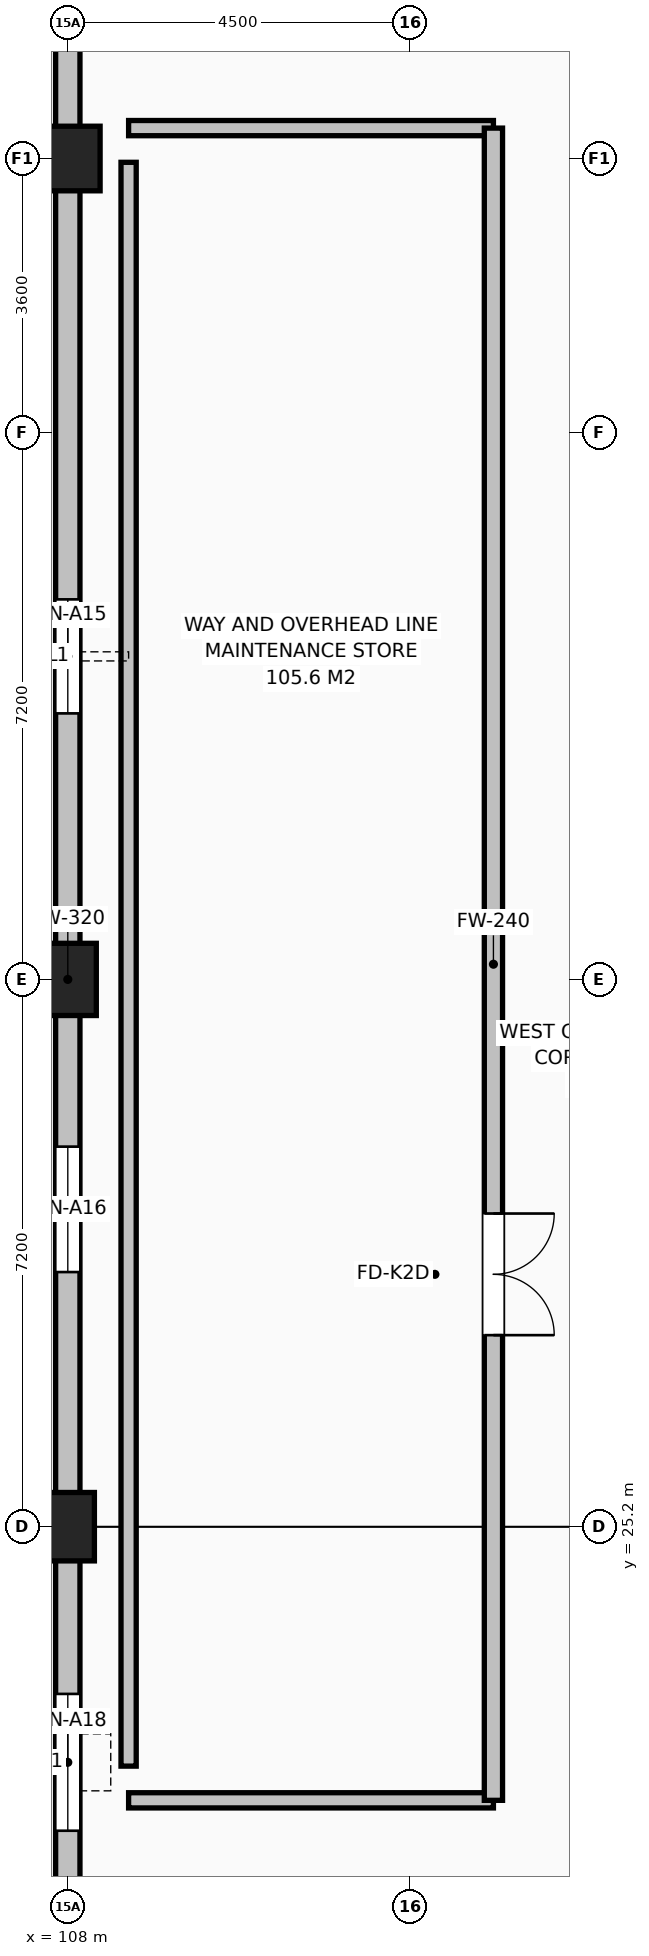
"""IFC4 building model, lengths in metres.
Left out: names, types, materials, properties, quantities, classifications, styles, units other than length and angle.
Written with IfcOpenShell. Run it as: python <this file> out.ifc"""

import sys

from ifc_helpers import new_model, si_unit, direction, frame, frame_2d, origin, origin_2d, place, context, subcontext, project, spatial, rectangle, extrude, element, fill, save


model = new_model("IFC4")
c1 = context("Model", 3, precision=1e-05, world=origin(), true_north=direction((0.0, 1.0)))
c2 = subcontext(c1, "Body", "Model", "MODEL_VIEW")
j1 = project(units=[si_unit("LENGTHUNIT", "METRE"), si_unit("PLANEANGLEUNIT", "RADIAN")], contexts=[c1])
p1 = place(None, origin())
s1 = spatial("IfcSite", under=j1, at=p1, CompositionType="ELEMENT")
p2 = place(p1, origin())
s2 = spatial("IfcBuilding", under=s1, at=p2, CompositionType="ELEMENT")
p3 = place(p2, origin())
s3 = spatial("IfcBuildingStorey", under=s2, at=p3, CompositionType="ELEMENT", Elevation=0.0)
p4 = place(p3, frame((108.0, 25.2, 0.0), z_axis=(0.0, 0.0, 1.0), x_axis=(1.0, 0.0, 0.0)))
e1 = element("IfcColumn", 1, at=p4, inside=s3, PredefinedType="COLUMN", context=c2, shape_type="SweptSolid", body=[
    extrude(rectangle(XDim=0.7, YDim=0.9, at=origin_2d()), origin(), (0.0, 0.0, 1.0), 4.8),
])
p5 = place(p3, frame((108.0, 32.4, 0.0), z_axis=(0.0, 0.0, 1.0), x_axis=(1.0, 0.0, 0.0)))
e2 = element("IfcColumn", 2, at=p5, inside=s3, PredefinedType="COLUMN", context=c2, shape_type="SweptSolid", body=[
    extrude(rectangle(XDim=0.75, YDim=0.95, at=origin_2d()), origin(), (0.0, 0.0, 1.0), 4.8),
])
p6 = place(p3, frame((108.0, 43.2, 0.0), z_axis=(0.0, 0.0, 1.0), x_axis=(1.0, 0.0, 0.0)))
e3 = element("IfcColumn", 3, at=p6, inside=s3, PredefinedType="COLUMN", context=c2, shape_type="SweptSolid", body=[
    extrude(rectangle(XDim=0.85, YDim=0.85, at=origin_2d()), origin(), (0.0, 0.0, 1.0), 4.8),
])
p7 = place(p3, frame((108.0, 54.0, 0.0), z_axis=(0.0, 0.0, 1.0), x_axis=(0.0, -1.0, 0.0)))
e4 = element("IfcWall", 4, at=p7, inside=s3, PredefinedType="SOLIDWALL", context=c2, shape_type="SweptSolid", body=[
    extrude(rectangle(XDim=43.2, YDim=0.32, at=frame_2d((21.6, 0.0))), origin(), (0.0, 0.0, 1.0), 4.25),
])
p8 = place(p7, frame((2.2, 0.0, 0.72)))
e5 = element("IfcOpeningElement", 5, at=p8, cuts=e4, PredefinedType="OPENING", context=c2, shape_type="SweptSolid", body=[
    extrude(rectangle(XDim=1.2, YDim=2.0, at=frame_2d((0.6, 1.0))), frame((0.0, 0.17, 0.0), z_axis=(0.0, -1.0, 0.0), x_axis=(1.0, 0.0, 0.0)), (0.0, 0.0, 1.0), 0.34),
])
p9 = place(p7, frame((16.6, 0.0, 0.72)))
e6 = element("IfcOpeningElement", 6, at=p9, cuts=e4, PredefinedType="OPENING", context=c2, shape_type="SweptSolid", body=[
    extrude(rectangle(XDim=1.5, YDim=2.1, at=frame_2d((0.75, 1.05))), frame((0.0, 0.17, 0.0), z_axis=(0.0, -1.0, 0.0), x_axis=(1.0, 0.0, 0.0)), (0.0, 0.0, 1.0), 0.34),
])
p10 = place(p7, frame((23.8, 0.0, 0.72)))
e7 = element("IfcOpeningElement", 7, at=p10, cuts=e4, PredefinedType="OPENING", context=c2, shape_type="SweptSolid", body=[
    extrude(rectangle(XDim=1.65, YDim=2.1, at=frame_2d((0.825, 1.05))), frame((0.0, 0.17, 0.0), z_axis=(0.0, -1.0, 0.0), x_axis=(1.0, 0.0, 0.0)), (0.0, 0.0, 1.0), 0.34),
])
p11 = place(p7, frame((31.0, 0.0, 0.72)))
e8 = element("IfcOpeningElement", 8, at=p11, cuts=e4, PredefinedType="OPENING", context=c2, shape_type="SweptSolid", body=[
    extrude(rectangle(XDim=1.8, YDim=2.15, at=frame_2d((0.9, 1.075))), frame((0.0, 0.17, 0.0), z_axis=(0.0, -1.0, 0.0), x_axis=(1.0, 0.0, 0.0)), (0.0, 0.0, 1.0), 0.34),
])
p12 = place(p7, frame((6.2, 0.0, 0.0)))
e9 = element("IfcOpeningElement", 9, at=p12, cuts=e4, PredefinedType="OPENING", context=c2, shape_type="SweptSolid", body=[
    extrude(rectangle(XDim=2.0, YDim=2.35, at=frame_2d((1.0, 1.175))), frame((0.0, 0.17, 0.0), z_axis=(0.0, -1.0, 0.0), x_axis=(1.0, 0.0, 0.0)), (0.0, 0.0, 1.0), 0.34),
])
for number, where, z_axis, x_axis in (
    (10, (108.8, 43.6, 0.0), (0.0, 0.0, 1.0), (1.0, 0.0, 0.0)),
    (11, (113.6, 21.6, 0.0), (0.0, 0.0, 1.0), (-1.0, 0.0, 0.0)),
):
    element("IfcWall", number, at=place(p3, frame(where, z_axis=z_axis, x_axis=x_axis)), inside=s3, PredefinedType="SOLIDWALL", context=c2, shape_type="SweptSolid", body=[
        extrude(rectangle(XDim=4.8, YDim=0.2, at=frame_2d((2.4, 0.0))), origin(), (0.0, 0.0, 1.0), 4.0),
    ])
p13 = place(p3, frame((108.8, 43.15, 0.0), z_axis=(0.0, 0.0, 1.0), x_axis=(0.0, -1.0, 0.0)))
e12 = element("IfcWall", 12, at=p13, inside=s3, PredefinedType="SOLIDWALL", context=c2, shape_type="SweptSolid", body=[
    extrude(rectangle(XDim=21.1, YDim=0.2, at=frame_2d((10.55, 0.0))), origin(), (0.0, 0.0, 1.0), 3.807),
])
p14 = place(p3, frame((113.6, 21.6, 0.0), z_axis=(0.0, 0.0, 1.0), x_axis=(0.0, 1.0, 0.0)))
e13 = element("IfcWall", 13, at=p14, inside=s3, PredefinedType="SOLIDWALL", context=c2, shape_type="SweptSolid", body=[
    extrude(rectangle(XDim=22.0, YDim=0.24, at=frame_2d((11.0, 0.0))), origin(), (0.0, 0.0, 1.0), 3.807),
])
p15 = place(p14, frame((6.12, 0.0, 0.0)))
e14 = element("IfcOpeningElement", 14, at=p15, cuts=e13, PredefinedType="OPENING", context=c2, shape_type="SweptSolid", body=[
    extrude(rectangle(XDim=1.6, YDim=2.15, at=frame_2d((0.8, 1.075))), frame((0.0, 0.13, 0.0), z_axis=(0.0, -1.0, 0.0), x_axis=(1.0, 0.0, 0.0)), (0.0, 0.0, 1.0), 0.26),
])
p16 = place(p9, origin())
e15 = element("IfcWindow", 15, at=p16, inside=s3, PartitioningType="SINGLE_PANEL", PredefinedType="WINDOW", context=c2, shape_type="SweptSolid", body=[
    extrude(rectangle(XDim=1.5, YDim=2.1, at=frame_2d((0.75, 1.05))), frame((0.0, 0.03, 0.0), z_axis=(0.0, -1.0, 0.0), x_axis=(1.0, 0.0, 0.0)), (0.0, 0.0, 1.0), 0.06),
])
fill(e6, e15)
p17 = place(p10, origin())
e16 = element("IfcWindow", 16, at=p17, inside=s3, PartitioningType="SINGLE_PANEL", PredefinedType="WINDOW", context=c2, shape_type="SweptSolid", body=[
    extrude(rectangle(XDim=1.65, YDim=2.1, at=frame_2d((0.825, 1.05))), frame((0.0, 0.03, 0.0), z_axis=(0.0, -1.0, 0.0), x_axis=(1.0, 0.0, 0.0)), (0.0, 0.0, 1.0), 0.06),
])
fill(e7, e16)
p18 = place(p11, origin())
e17 = element("IfcWindow", 17, at=p18, inside=s3, PartitioningType="SINGLE_PANEL", PredefinedType="WINDOW", context=c2, shape_type="SweptSolid", body=[
    extrude(rectangle(XDim=1.8, YDim=2.15, at=frame_2d((0.9, 1.075))), frame((0.0, 0.03, 0.0), z_axis=(0.0, -1.0, 0.0), x_axis=(1.0, 0.0, 0.0)), (0.0, 0.0, 1.0), 0.06),
])
fill(e8, e17)
p19 = place(p15, origin())
e18 = element("IfcDoor", 18, at=p19, inside=s3, OperationType="DOUBLE_SWING_RIGHT", PredefinedType="DOOR", context=c2, shape_type="SweptSolid", body=[
    extrude(rectangle(XDim=1.6, YDim=2.15, at=frame_2d((0.8, 1.075))), frame((0.0, 0.025, 0.0), z_axis=(0.0, -1.0, 0.0), x_axis=(1.0, 0.0, 0.0)), (0.0, 0.0, 1.0), 0.05),
])
fill(e14, e18)
save(model, sys.argv[1])
